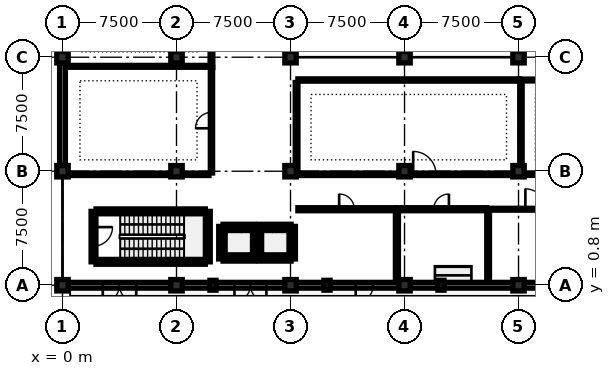
"""IFC4 building model, lengths in metres.
Left out: names, types, materials, properties, quantities, classifications, styles, units other than length and angle.
Written with IfcOpenShell. Run it as: python <this file> out.ifc"""

import sys

from ifc_helpers import new_model, si_unit, direction, frame, frame_2d, origin, origin_2d, place, context, subcontext, project, spatial, rectangle, extrude, element, fill, save


model = new_model("IFC4")
c1 = context("Model", 3, precision=1e-05, world=origin(), true_north=direction((0.0, 1.0)))
c2 = subcontext(c1, "Body", "Model", "MODEL_VIEW")
j1 = project(units=[si_unit("LENGTHUNIT", "METRE"), si_unit("PLANEANGLEUNIT", "RADIAN")], contexts=[c1])
p1 = place(None, origin())
s1 = spatial("IfcSite", under=j1, at=p1, CompositionType="ELEMENT")
p2 = place(p1, origin())
s2 = spatial("IfcBuilding", under=s1, at=p2, CompositionType="ELEMENT")
p3 = place(p2, origin())
s3 = spatial("IfcBuildingStorey", under=s2, at=p3, CompositionType="ELEMENT", Elevation=0.0)
for number, where, z_axis, x_axis in (
    (1, (0.0, 0.8, 0.0), (0.0, 0.0, 1.0), (1.0, 0.0, 0.0)),
    (2, (0.0, 8.3, 0.0), (0.0, 0.0, 1.0), (1.0, 0.0, 0.0)),
    (3, (0.0, 15.8, 0.0), (0.0, 0.0, 1.0), (1.0, 0.0, 0.0)),
    (4, (7.5, 0.8, 0.0), (0.0, 0.0, 1.0), (1.0, 0.0, 0.0)),
    (5, (7.5, 8.3, 0.0), (0.0, 0.0, 1.0), (1.0, 0.0, 0.0)),
    (6, (7.5, 15.8, 0.0), (0.0, 0.0, 1.0), (1.0, 0.0, 0.0)),
    (7, (15.0, 0.8, 0.0), (0.0, 0.0, 1.0), (1.0, 0.0, 0.0)),
    (8, (15.0, 8.3, 0.0), (0.0, 0.0, 1.0), (1.0, 0.0, 0.0)),
    (9, (15.0, 15.8, 0.0), (0.0, 0.0, 1.0), (1.0, 0.0, 0.0)),
    (10, (22.5, 0.8, 0.0), (0.0, 0.0, 1.0), (1.0, 0.0, 0.0)),
    (11, (22.5, 8.3, 0.0), (0.0, 0.0, 1.0), (1.0, 0.0, 0.0)),
    (12, (22.5, 15.8, 0.0), (0.0, 0.0, 1.0), (1.0, 0.0, 0.0)),
    (13, (30.0, 0.8, 0.0), (0.0, 0.0, 1.0), (1.0, 0.0, 0.0)),
    (14, (30.0, 8.3, 0.0), (0.0, 0.0, 1.0), (1.0, 0.0, 0.0)),
    (15, (30.0, 15.8, 0.0), (0.0, 0.0, 1.0), (1.0, 0.0, 0.0)),
):
    element("IfcColumn", number, at=place(p3, frame(where, z_axis=z_axis, x_axis=x_axis)), inside=s3, PredefinedType="COLUMN", context=c2, shape_type="SweptSolid", body=[
        extrude(rectangle(XDim=0.75, YDim=0.75, at=origin_2d()), origin(), (0.0, 0.0, 1.0), 4.7),
    ])
for number, where, z_axis, x_axis in (
    (16, (9.9, 0.8, 0.0), (0.0, 0.0, 1.0), (1.0, 0.0, 0.0)),
    (17, (17.4, 0.8, 0.0), (0.0, 0.0, 1.0), (1.0, 0.0, 0.0)),
    (18, (24.9, 0.8, 0.0), (0.0, 0.0, 1.0), (1.0, 0.0, 0.0)),
):
    element("IfcColumn", number, at=place(p3, frame(where, z_axis=z_axis, x_axis=x_axis)), inside=s3, PredefinedType="PILASTER", context=c2, shape_type="SweptSolid", body=[
        extrude(rectangle(XDim=0.4, YDim=0.65, at=origin_2d()), origin(), (0.0, 0.0, 1.0), 4.7),
    ])
p4 = place(p3, frame((32.2, 0.8, 0.0), z_axis=(0.0, 0.0, 1.0), x_axis=(-1.0, 0.0, 0.0)))
e19 = element("IfcWall", 19, at=p4, inside=s3, PredefinedType="SOLIDWALL", context=c2, shape_type="SweptSolid", body=[
    extrude(rectangle(XDim=1.825, YDim=0.38, at=frame_2d((0.913, 0.0))), origin(), (0.0, 0.0, 1.0), 4.035),
])
p5 = place(p3, frame((29.625, 0.8, 0.0), z_axis=(0.0, 0.0, 1.0), x_axis=(-1.0, 0.0, 0.0)))
e20 = element("IfcWall", 20, at=p5, inside=s3, PredefinedType="SOLIDWALL", context=c2, shape_type="SweptSolid", body=[
    extrude(rectangle(XDim=4.525, YDim=0.38, at=frame_2d((2.262, 0.0))), origin(), (0.0, 0.0, 1.0), 4.035),
])
p6 = place(p3, frame((24.7, 0.8, 0.0), z_axis=(0.0, 0.0, 1.0), x_axis=(-1.0, 0.0, 0.0)))
e21 = element("IfcWall", 21, at=p6, inside=s3, PredefinedType="SOLIDWALL", context=c2, shape_type="SweptSolid", body=[
    extrude(rectangle(XDim=1.825, YDim=0.38, at=frame_2d((0.913, 0.0))), origin(), (0.0, 0.0, 1.0), 4.035),
])
p7 = place(p3, frame((22.125, 0.8, 0.0), z_axis=(0.0, 0.0, 1.0), x_axis=(-1.0, 0.0, 0.0)))
e22 = element("IfcWall", 22, at=p7, inside=s3, PredefinedType="SOLIDWALL", context=c2, shape_type="SweptSolid", body=[
    extrude(rectangle(XDim=4.525, YDim=0.38, at=frame_2d((2.262, 0.0))), origin(), (0.0, 0.0, 1.0), 4.035),
])
p8 = place(p7, frame((1.688, 0.0, 0.0)))
e23 = element("IfcOpeningElement", 23, at=p8, cuts=e22, PredefinedType="OPENING", context=c2, shape_type="SweptSolid", body=[
    extrude(rectangle(XDim=1.15, YDim=2.2, at=frame_2d((0.575, 1.1))), frame((0.0, 0.202, 0.0), z_axis=(0.0, -1.0, 0.0), x_axis=(1.0, 0.0, 0.0)), (0.0, 0.0, 1.0), 0.404),
])
p9 = place(p3, frame((17.2, 0.8, 0.0), z_axis=(0.0, 0.0, 1.0), x_axis=(-1.0, 0.0, 0.0)))
e24 = element("IfcWall", 24, at=p9, inside=s3, PredefinedType="SOLIDWALL", context=c2, shape_type="SweptSolid", body=[
    extrude(rectangle(XDim=1.825, YDim=0.38, at=frame_2d((0.913, 0.0))), origin(), (0.0, 0.0, 1.0), 4.035),
])
p10 = place(p3, frame((14.625, 0.8, 0.0), z_axis=(0.0, 0.0, 1.0), x_axis=(-1.0, 0.0, 0.0)))
e25 = element("IfcWall", 25, at=p10, inside=s3, PredefinedType="SOLIDWALL", context=c2, shape_type="SweptSolid", body=[
    extrude(rectangle(XDim=4.525, YDim=0.38, at=frame_2d((2.262, 0.0))), origin(), (0.0, 0.0, 1.0), 4.035),
])
p11 = place(p10, frame((1.212, 0.0, 0.0)))
e26 = element("IfcOpeningElement", 26, at=p11, cuts=e25, PredefinedType="OPENING", context=c2, shape_type="SweptSolid", body=[
    extrude(rectangle(XDim=2.1, YDim=2.4, at=frame_2d((1.05, 1.2))), frame((0.0, 0.202, 0.0), z_axis=(0.0, -1.0, 0.0), x_axis=(1.0, 0.0, 0.0)), (0.0, 0.0, 1.0), 0.404),
])
p12 = place(p3, frame((9.7, 0.8, 0.0), z_axis=(0.0, 0.0, 1.0), x_axis=(-1.0, 0.0, 0.0)))
e27 = element("IfcWall", 27, at=p12, inside=s3, PredefinedType="SOLIDWALL", context=c2, shape_type="SweptSolid", body=[
    extrude(rectangle(XDim=1.825, YDim=0.38, at=frame_2d((0.913, 0.0))), origin(), (0.0, 0.0, 1.0), 4.035),
])
p13 = place(p3, frame((7.125, 0.8, 0.0), z_axis=(0.0, 0.0, 1.0), x_axis=(-1.0, 0.0, 0.0)))
e28 = element("IfcWall", 28, at=p13, inside=s3, PredefinedType="SOLIDWALL", context=c2, shape_type="SweptSolid", body=[
    extrude(rectangle(XDim=6.75, YDim=0.38, at=frame_2d((3.375, 0.0))), origin(), (0.0, 0.0, 1.0), 4.035),
])
p14 = place(p13, frame((2.275, 0.0, 0.0)))
e29 = element("IfcOpeningElement", 29, at=p14, cuts=e28, PredefinedType="OPENING", context=c2, shape_type="SweptSolid", body=[
    extrude(rectangle(XDim=2.2, YDim=2.45, at=frame_2d((1.1, 1.225))), frame((0.0, 0.202, 0.0), z_axis=(0.0, -1.0, 0.0), x_axis=(1.0, 0.0, 0.0)), (0.0, 0.0, 1.0), 0.404),
])
p15 = place(p3, frame((0.0, 8.675, 0.0), z_axis=(0.0, 0.0, 1.0), x_axis=(0.0, 1.0, 0.0)))
e30 = element("IfcWall", 30, at=p15, inside=s3, PredefinedType="SOLIDWALL", context=c2, shape_type="SweptSolid", body=[
    extrude(rectangle(XDim=6.75, YDim=0.38, at=frame_2d((3.375, 0.0))), origin(), (0.0, 0.0, 1.0), 4.035),
])
p16 = place(p3, frame((2.205, 2.34, 0.0), z_axis=(0.0, 0.0, 1.0), x_axis=(1.0, 0.0, 0.0)))
e31 = element("IfcWall", 31, at=p16, inside=s3, PredefinedType="SHEAR", context=c2, shape_type="SweptSolid", body=[
    extrude(rectangle(XDim=7.19, YDim=0.32, at=frame_2d((3.595, 0.0))), origin(), (0.0, 0.0, 1.0), 4.7),
])
p17 = place(p3, frame((9.56, 2.34, 0.0), z_axis=(0.0, 0.0, 1.0), x_axis=(0.0, 1.0, 0.0)))
e32 = element("IfcWall", 32, at=p17, inside=s3, PredefinedType="SHEAR", context=c2, shape_type="SweptSolid", body=[
    extrude(rectangle(XDim=3.32, YDim=0.32, at=frame_2d((1.66, 0.0))), origin(), (0.0, 0.0, 1.0), 4.7),
])
p18 = place(p3, frame((9.395, 5.66, 0.0), z_axis=(0.0, 0.0, 1.0), x_axis=(-1.0, 0.0, 0.0)))
e33 = element("IfcWall", 33, at=p18, inside=s3, PredefinedType="SHEAR", context=c2, shape_type="SweptSolid", body=[
    extrude(rectangle(XDim=7.19, YDim=0.32, at=frame_2d((3.595, 0.0))), origin(), (0.0, 0.0, 1.0), 4.7),
])
p19 = place(p3, frame((2.04, 5.66, 0.0), z_axis=(0.0, 0.0, 1.0), x_axis=(0.0, -1.0, 0.0)))
e34 = element("IfcWall", 34, at=p19, inside=s3, PredefinedType="SHEAR", context=c2, shape_type="SweptSolid", body=[
    extrude(rectangle(XDim=3.32, YDim=0.32, at=frame_2d((1.66, 0.0))), origin(), (0.0, 0.0, 1.0), 4.7),
])
p20 = place(p19, frame((1.035, 0.0, 0.0)))
e35 = element("IfcOpeningElement", 35, at=p20, cuts=e34, PredefinedType="OPENING", context=c2, shape_type="SweptSolid", body=[
    extrude(rectangle(XDim=1.25, YDim=2.2, at=frame_2d((0.625, 1.1))), frame((0.0, 0.172, 0.0), z_axis=(0.0, -1.0, 0.0), x_axis=(1.0, 0.0, 0.0)), (0.0, 0.0, 1.0), 0.344),
])
p21 = place(p3, frame((10.562, 2.529, 0.0), z_axis=(0.0, 0.0, 1.0), x_axis=(1.0, 0.0, 0.0)))
e36 = element("IfcWall", 36, at=p21, inside=s3, PredefinedType="SHEAR", context=c2, shape_type="SweptSolid", body=[
    extrude(rectangle(XDim=2.077, YDim=0.28, at=frame_2d((1.039, 0.0))), origin(), (0.0, 0.0, 1.0), 4.7),
])
p22 = place(p3, frame((12.783, 2.529, 0.0), z_axis=(0.0, 0.0, 1.0), x_axis=(0.0, 1.0, 0.0)))
e37 = element("IfcWall", 37, at=p22, inside=s3, PredefinedType="SHEAR", context=c2, shape_type="SweptSolid", body=[
    extrude(rectangle(XDim=2.141, YDim=0.28, at=frame_2d((1.071, 0.0))), origin(), (0.0, 0.0, 1.0), 4.7),
])
p23 = place(p3, frame((12.638, 4.671, 0.0), z_axis=(0.0, 0.0, 1.0), x_axis=(-1.0, 0.0, 0.0)))
e38 = element("IfcWall", 38, at=p23, inside=s3, PredefinedType="SHEAR", context=c2, shape_type="SweptSolid", body=[
    extrude(rectangle(XDim=2.077, YDim=0.28, at=frame_2d((1.039, 0.0))), origin(), (0.0, 0.0, 1.0), 4.7),
])
p24 = place(p23, frame((0.489, 0.0, 0.0)))
e39 = element("IfcOpeningElement", 39, at=p24, cuts=e38, PredefinedType="OPENING", context=c2, shape_type="SweptSolid", body=[
    extrude(rectangle(XDim=1.1, YDim=2.15, at=frame_2d((0.55, 1.075))), frame((0.0, 0.152, 0.0), z_axis=(0.0, -1.0, 0.0), x_axis=(1.0, 0.0, 0.0)), (0.0, 0.0, 1.0), 0.304),
])
p25 = place(p3, frame((10.417, 4.671, 0.0), z_axis=(0.0, 0.0, 1.0), x_axis=(0.0, -1.0, 0.0)))
e40 = element("IfcWall", 40, at=p25, inside=s3, PredefinedType="SHEAR", context=c2, shape_type="SweptSolid", body=[
    extrude(rectangle(XDim=2.141, YDim=0.28, at=frame_2d((1.071, 0.0))), origin(), (0.0, 0.0, 1.0), 4.7),
])
p26 = place(p3, frame((12.928, 2.529, 0.0), z_axis=(0.0, 0.0, 1.0), x_axis=(1.0, 0.0, 0.0)))
e41 = element("IfcWall", 41, at=p26, inside=s3, PredefinedType="SHEAR", context=c2, shape_type="SweptSolid", body=[
    extrude(rectangle(XDim=2.11, YDim=0.28, at=frame_2d((1.055, 0.0))), origin(), (0.0, 0.0, 1.0), 4.7),
])
p27 = place(p3, frame((15.184, 2.529, 0.0), z_axis=(0.0, 0.0, 1.0), x_axis=(0.0, 1.0, 0.0)))
e42 = element("IfcWall", 42, at=p27, inside=s3, PredefinedType="SHEAR", context=c2, shape_type="SweptSolid", body=[
    extrude(rectangle(XDim=2.141, YDim=0.28, at=frame_2d((1.071, 0.0))), origin(), (0.0, 0.0, 1.0), 4.7),
])
p28 = place(p3, frame((15.039, 4.671, 0.0), z_axis=(0.0, 0.0, 1.0), x_axis=(-1.0, 0.0, 0.0)))
e43 = element("IfcWall", 43, at=p28, inside=s3, PredefinedType="SHEAR", context=c2, shape_type="SweptSolid", body=[
    extrude(rectangle(XDim=2.11, YDim=0.28, at=frame_2d((1.055, 0.0))), origin(), (0.0, 0.0, 1.0), 4.7),
])
p29 = place(p28, frame((0.505, 0.0, 0.0)))
e44 = element("IfcOpeningElement", 44, at=p29, cuts=e43, PredefinedType="OPENING", context=c2, shape_type="SweptSolid", body=[
    extrude(rectangle(XDim=1.1, YDim=2.15, at=frame_2d((0.55, 1.075))), frame((0.0, 0.152, 0.0), z_axis=(0.0, -1.0, 0.0), x_axis=(1.0, 0.0, 0.0)), (0.0, 0.0, 1.0), 0.304),
])
p30 = place(p3, frame((15.485, 5.8, 0.0), z_axis=(0.0, 0.0, 1.0), x_axis=(1.0, 0.0, 0.0)))
e45 = element("IfcWall", 45, at=p30, inside=s3, PredefinedType="PARTITIONING", context=c2, shape_type="SweptSolid", body=[
    extrude(rectangle(XDim=6.43, YDim=0.2, at=frame_2d((3.215, 0.0))), origin(), (0.0, 0.0, 1.0), 4.7),
])
p31 = place(p30, frame((2.715, 0.0, 0.0)))
e46 = element("IfcOpeningElement", 46, at=p31, cuts=e45, PredefinedType="OPENING", context=c2, shape_type="SweptSolid", body=[
    extrude(rectangle(XDim=1.0, YDim=2.15, at=frame_2d((0.5, 1.075))), frame((0.0, 0.112, 0.0), z_axis=(0.0, -1.0, 0.0), x_axis=(1.0, 0.0, 0.0)), (0.0, 0.0, 1.0), 0.224),
])
p32 = place(p3, frame((21.927, 5.8, 0.0), z_axis=(0.0, 0.0, 1.0), x_axis=(1.0, 0.0, 0.0)))
e47 = element("IfcWall", 47, at=p32, inside=s3, PredefinedType="PARTITIONING", context=c2, shape_type="SweptSolid", body=[
    extrude(rectangle(XDim=5.988, YDim=0.2, at=frame_2d((2.994, 0.0))), origin(), (0.0, 0.0, 1.0), 3.765),
])
p33 = place(p32, frame((2.494, 0.0, 0.0)))
e48 = element("IfcOpeningElement", 48, at=p33, cuts=e47, PredefinedType="OPENING", context=c2, shape_type="SweptSolid", body=[
    extrude(rectangle(XDim=1.0, YDim=2.15, at=frame_2d((0.5, 1.075))), frame((0.0, 0.112, 0.0), z_axis=(0.0, -1.0, 0.0), x_axis=(1.0, 0.0, 0.0)), (0.0, 0.0, 1.0), 0.224),
])
p34 = place(p3, frame((27.927, 5.8, 0.0), z_axis=(0.0, 0.0, 1.0), x_axis=(1.0, 0.0, 0.0)))
e49 = element("IfcWall", 49, at=p34, inside=s3, PredefinedType="PARTITIONING", context=c2, shape_type="SweptSolid", body=[
    extrude(rectangle(XDim=6.388, YDim=0.125, at=frame_2d((3.194, 0.0))), origin(), (0.0, 0.0, 1.0), 3.985),
])
p35 = place(p34, frame((2.524, 0.0, 0.0)))
e50 = element("IfcOpeningElement", 50, at=p35, cuts=e49, PredefinedType="OPENING", context=c2, shape_type="SweptSolid", body=[
    extrude(rectangle(XDim=1.34, YDim=2.24, at=frame_2d((0.67, 1.12))), frame((0.0, 0.074, 0.0), z_axis=(0.0, -1.0, 0.0), x_axis=(1.0, 0.0, 0.0)), (0.0, 0.0, 1.0), 0.149),
])
p36 = place(p3, frame((15.387, 8.1, 0.0), z_axis=(0.0, 0.0, 1.0), x_axis=(1.0, 0.0, 0.0)))
e51 = element("IfcWall", 51, at=p36, inside=s3, PredefinedType="PARTITIONING", context=c2, shape_type="SweptSolid", body=[
    extrude(rectangle(XDim=14.521, YDim=0.16, at=frame_2d((7.26, 0.0))), origin(), (0.0, 0.0, 1.0), 3.765),
])
p37 = place(p36, frame((7.682, 0.0, 0.0)))
e52 = element("IfcOpeningElement", 52, at=p37, cuts=e51, PredefinedType="OPENING", context=c2, shape_type="SweptSolid", body=[
    extrude(rectangle(XDim=1.5, YDim=2.28, at=frame_2d((0.75, 1.14))), frame((0.0, 0.092, 0.0), z_axis=(0.0, -1.0, 0.0), x_axis=(1.0, 0.0, 0.0)), (0.0, 0.0, 1.0), 0.184),
])
p38 = place(p3, frame((30.387, 8.1, 0.0), z_axis=(0.0, 0.0, 1.0), x_axis=(1.0, 0.0, 0.0)))
e53 = element("IfcWall", 53, at=p38, inside=s3, PredefinedType="PARTITIONING", context=c2, shape_type="SweptSolid", body=[
    extrude(rectangle(XDim=14.281, YDim=0.15, at=frame_2d((7.141, 0.0))), origin(), (0.0, 0.0, 1.0), 3.985),
])
p39 = place(p38, frame((7.887, 0.0, 0.0)))
e54 = element("IfcOpeningElement", 54, at=p39, cuts=e53, PredefinedType="OPENING", context=c2, shape_type="SweptSolid", body=[
    extrude(rectangle(XDim=1.56, YDim=2.3, at=frame_2d((0.78, 1.15))), frame((0.0, 0.087, 0.0), z_axis=(0.0, -1.0, 0.0), x_axis=(1.0, 0.0, 0.0)), (0.0, 0.0, 1.0), 0.174),
])
p40 = place(p3, frame((9.8, 8.185, 0.0), z_axis=(0.0, 0.0, 1.0), x_axis=(0.0, 1.0, 0.0)))
e55 = element("IfcWall", 55, at=p40, inside=s3, PredefinedType="PARTITIONING", context=c2, shape_type="SweptSolid", body=[
    extrude(rectangle(XDim=6.93, YDim=0.15, at=frame_2d((3.465, 0.0))), origin(), (0.0, 0.0, 1.0), 3.765),
])
p41 = place(p40, frame((2.94, 0.0, 0.0)))
e56 = element("IfcOpeningElement", 56, at=p41, cuts=e55, PredefinedType="OPENING", context=c2, shape_type="SweptSolid", body=[
    extrude(rectangle(XDim=1.05, YDim=2.15, at=frame_2d((0.525, 1.075))), frame((0.0, 0.087, 0.0), z_axis=(0.0, -1.0, 0.0), x_axis=(1.0, 0.0, 0.0)), (0.0, 0.0, 1.0), 0.174),
])
p42 = place(p3, frame((9.8, 15.127, 0.0), z_axis=(0.0, 0.0, 1.0), x_axis=(0.0, 1.0, 0.0)))
e57 = element("IfcWall", 57, at=p42, inside=s3, PredefinedType="PARTITIONING", context=c2, shape_type="SweptSolid", body=[
    extrude(rectangle(XDim=7.188, YDim=0.18, at=frame_2d((3.594, 0.0))), origin(), (0.0, 0.0, 1.0), 3.765),
])
p43 = place(p42, frame((2.994, 0.0, 0.0)))
e58 = element("IfcOpeningElement", 58, at=p43, cuts=e57, PredefinedType="OPENING", context=c2, shape_type="SweptSolid", body=[
    extrude(rectangle(XDim=1.2, YDim=2.15, at=frame_2d((0.6, 1.075))), frame((0.0, 0.102, 0.0), z_axis=(0.0, -1.0, 0.0), x_axis=(1.0, 0.0, 0.0)), (0.0, 0.0, 1.0), 0.204),
])
p44 = place(p3, frame((15.485, 14.3, 0.0), z_axis=(0.0, 0.0, 1.0), x_axis=(1.0, 0.0, 0.0)))
e59 = element("IfcWall", 59, at=p44, inside=s3, PredefinedType="PARTITIONING", context=c2, shape_type="SweptSolid", body=[
    extrude(rectangle(XDim=14.59, YDim=0.15, at=frame_2d((7.295, 0.0))), origin(), (0.0, 0.0, 1.0), 3.765),
])
p45 = place(p3, frame((30.087, 14.3, 0.0), z_axis=(0.0, 0.0, 1.0), x_axis=(1.0, 0.0, 0.0)))
e60 = element("IfcWall", 60, at=p45, inside=s3, PredefinedType="PARTITIONING", context=c2, shape_type="SweptSolid", body=[
    extrude(rectangle(XDim=14.748, YDim=0.125, at=frame_2d((7.374, 0.0))), origin(), (0.0, 0.0, 1.0), 3.985),
])
p46 = place(p3, frame((22.0, 1.002, 0.0), z_axis=(0.0, 0.0, 1.0), x_axis=(0.0, 1.0, 0.0)))
e61 = element("IfcWall", 61, at=p46, inside=s3, PredefinedType="PARTITIONING", context=c2, shape_type="SweptSolid", body=[
    extrude(rectangle(XDim=4.711, YDim=0.2, at=frame_2d((2.355, 0.0))), origin(), (0.0, 0.0, 1.0), 4.035),
])
p47 = place(p3, frame((28.0, 1.002, 0.0), z_axis=(0.0, 0.0, 1.0), x_axis=(0.0, 1.0, 0.0)))
e62 = element("IfcWall", 62, at=p47, inside=s3, PredefinedType="PARTITIONING", context=c2, shape_type="SweptSolid", body=[
    extrude(rectangle(XDim=4.724, YDim=0.18, at=frame_2d((2.362, 0.0))), origin(), (0.0, 0.0, 1.0), 4.035),
])
p48 = place(p3, frame((15.4, 8.192, 0.0), z_axis=(0.0, 0.0, 1.0), x_axis=(0.0, 1.0, 0.0)))
e63 = element("IfcWall", 63, at=p48, inside=s3, PredefinedType="PARTITIONING", context=c2, shape_type="SweptSolid", body=[
    extrude(rectangle(XDim=5.943, YDim=0.18, at=frame_2d((2.972, 0.0))), origin(), (0.0, 0.0, 1.0), 3.765),
])
p49 = place(p3, frame((30.16, 8.432, 0.0), z_axis=(0.0, 0.0, 1.0), x_axis=(0.0, 1.0, 0.0)))
e64 = element("IfcWall", 64, at=p49, inside=s3, PredefinedType="PARTITIONING", context=c2, shape_type="SweptSolid", body=[
    extrude(rectangle(XDim=5.794, YDim=0.16, at=frame_2d((2.897, 0.0))), origin(), (0.0, 0.0, 1.0), 3.985),
])
p50 = place(p3, frame((0.387, 8.1, 0.0), z_axis=(0.0, 0.0, 1.0), x_axis=(1.0, 0.0, 0.0)))
e65 = element("IfcWall", 65, at=p50, inside=s3, PredefinedType="PARTITIONING", context=c2, shape_type="SweptSolid", body=[
    extrude(rectangle(XDim=9.248, YDim=0.16, at=frame_2d((4.624, 0.0))), origin(), (0.0, 0.0, 1.0), 3.765),
])
p51 = place(p3, frame((0.202, 15.2, 0.0), z_axis=(0.0, 0.0, 1.0), x_axis=(1.0, 0.0, 0.0)))
e66 = element("IfcWall", 66, at=p51, inside=s3, PredefinedType="PARTITIONING", context=c2, shape_type="SweptSolid", body=[
    extrude(rectangle(XDim=9.496, YDim=0.125, at=frame_2d((4.748, 0.0))), origin(), (0.0, 0.0, 1.0), 3.765),
])
p52 = place(p8, origin())
e67 = element("IfcDoor", 67, at=p52, inside=s3, OperationType="SINGLE_SWING_RIGHT", PredefinedType="DOOR", context=c2, shape_type="SweptSolid", body=[
    extrude(rectangle(XDim=1.15, YDim=2.2, at=frame_2d((0.575, 1.1))), frame((0.0, 0.025, 0.0), z_axis=(0.0, -1.0, 0.0), x_axis=(1.0, 0.0, 0.0)), (0.0, 0.0, 1.0), 0.05),
])
fill(e23, e67)
p53 = place(p11, origin())
e68 = element("IfcDoor", 68, at=p53, inside=s3, OperationType="DOUBLE_DOOR_SINGLE_SWING", PredefinedType="DOOR", context=c2, shape_type="SweptSolid", body=[
    extrude(rectangle(XDim=2.1, YDim=2.4, at=frame_2d((1.05, 1.2))), frame((0.0, 0.025, 0.0), z_axis=(0.0, -1.0, 0.0), x_axis=(1.0, 0.0, 0.0)), (0.0, 0.0, 1.0), 0.05),
])
fill(e26, e68)
p54 = place(p14, origin())
e69 = element("IfcDoor", 69, at=p54, inside=s3, OperationType="DOUBLE_DOOR_SINGLE_SWING", PredefinedType="DOOR", context=c2, shape_type="SweptSolid", body=[
    extrude(rectangle(XDim=2.2, YDim=2.45, at=frame_2d((1.1, 1.225))), frame((0.0, 0.025, 0.0), z_axis=(0.0, -1.0, 0.0), x_axis=(1.0, 0.0, 0.0)), (0.0, 0.0, 1.0), 0.05),
])
fill(e29, e69)
p55 = place(p20, origin())
e70 = element("IfcDoor", 70, at=p55, inside=s3, OperationType="SINGLE_SWING_LEFT", PredefinedType="DOOR", context=c2, shape_type="SweptSolid", body=[
    extrude(rectangle(XDim=1.25, YDim=2.2, at=frame_2d((0.625, 1.1))), frame((0.0, 0.025, 0.0), z_axis=(0.0, -1.0, 0.0), x_axis=(1.0, 0.0, 0.0)), (0.0, 0.0, 1.0), 0.05),
])
fill(e35, e70)
p56 = place(p24, origin())
e71 = element("IfcDoor", 71, at=p56, inside=s3, OperationType="SLIDING_TO_LEFT", PredefinedType="DOOR", context=c2, shape_type="SweptSolid", body=[
    extrude(rectangle(XDim=1.1, YDim=2.15, at=frame_2d((0.55, 1.075))), frame((0.0, 0.025, 0.0), z_axis=(0.0, -1.0, 0.0), x_axis=(1.0, 0.0, 0.0)), (0.0, 0.0, 1.0), 0.05),
])
fill(e39, e71)
p57 = place(p29, origin())
e72 = element("IfcDoor", 72, at=p57, inside=s3, OperationType="SLIDING_TO_RIGHT", PredefinedType="DOOR", context=c2, shape_type="SweptSolid", body=[
    extrude(rectangle(XDim=1.1, YDim=2.15, at=frame_2d((0.55, 1.075))), frame((0.0, 0.025, 0.0), z_axis=(0.0, -1.0, 0.0), x_axis=(1.0, 0.0, 0.0)), (0.0, 0.0, 1.0), 0.05),
])
fill(e44, e72)
p58 = place(p31, origin())
e73 = element("IfcDoor", 73, at=p58, inside=s3, OperationType="SINGLE_SWING_LEFT", PredefinedType="DOOR", context=c2, shape_type="SweptSolid", body=[
    extrude(rectangle(XDim=1.0, YDim=2.15, at=frame_2d((0.5, 1.075))), frame((0.0, 0.025, 0.0), z_axis=(0.0, -1.0, 0.0), x_axis=(1.0, 0.0, 0.0)), (0.0, 0.0, 1.0), 0.05),
])
fill(e46, e73)
p59 = place(p33, origin())
e74 = element("IfcDoor", 74, at=p59, inside=s3, OperationType="SINGLE_SWING_RIGHT", PredefinedType="DOOR", context=c2, shape_type="SweptSolid", body=[
    extrude(rectangle(XDim=1.0, YDim=2.15, at=frame_2d((0.5, 1.075))), frame((0.0, 0.025, 0.0), z_axis=(0.0, -1.0, 0.0), x_axis=(1.0, 0.0, 0.0)), (0.0, 0.0, 1.0), 0.05),
])
fill(e48, e74)
p60 = place(p35, origin())
e75 = element("IfcDoor", 75, at=p60, inside=s3, OperationType="SINGLE_SWING_LEFT", PredefinedType="DOOR", context=c2, shape_type="SweptSolid", body=[
    extrude(rectangle(XDim=1.34, YDim=2.24, at=frame_2d((0.67, 1.12))), frame((0.0, 0.025, 0.0), z_axis=(0.0, -1.0, 0.0), x_axis=(1.0, 0.0, 0.0)), (0.0, 0.0, 1.0), 0.05),
])
fill(e50, e75)
p61 = place(p37, origin())
e76 = element("IfcDoor", 76, at=p61, inside=s3, OperationType="SINGLE_SWING_LEFT", PredefinedType="DOOR", context=c2, shape_type="SweptSolid", body=[
    extrude(rectangle(XDim=1.5, YDim=2.28, at=frame_2d((0.75, 1.14))), frame((0.0, 0.025, 0.0), z_axis=(0.0, -1.0, 0.0), x_axis=(1.0, 0.0, 0.0)), (0.0, 0.0, 1.0), 0.05),
])
fill(e52, e76)
p62 = place(p41, origin())
e77 = element("IfcDoor", 77, at=p62, inside=s3, OperationType="SINGLE_SWING_LEFT", PredefinedType="DOOR", context=c2, shape_type="SweptSolid", body=[
    extrude(rectangle(XDim=1.05, YDim=2.15, at=frame_2d((0.525, 1.075))), frame((0.0, 0.025, 0.0), z_axis=(0.0, -1.0, 0.0), x_axis=(1.0, 0.0, 0.0)), (0.0, 0.0, 1.0), 0.05),
])
fill(e56, e77)
save(model, sys.argv[1])
